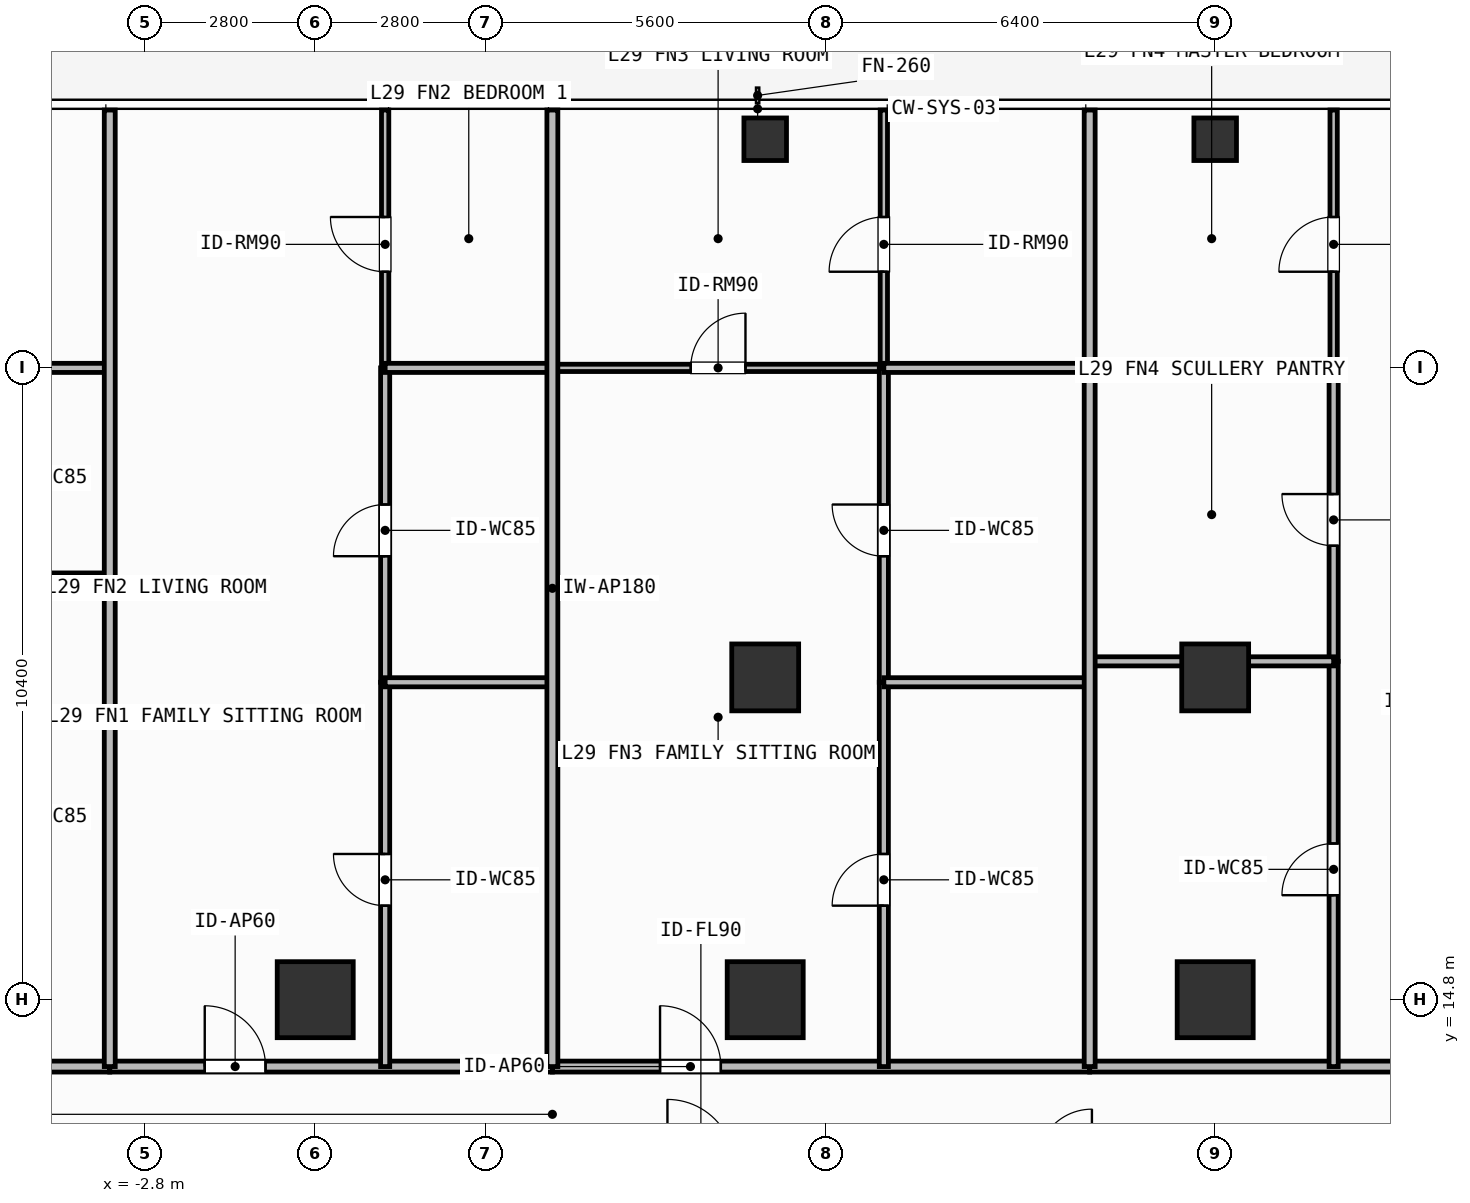
"""IFC4 building model, lengths in metres.
Left out: names, types, materials, properties, quantities, classifications, styles, units other than length and angle.
Written with IfcOpenShell. Run it as: python <this file> out.ifc"""

import sys

from ifc_helpers import new_model, si_unit, direction, frame, frame_2d, origin, origin_2d, place, context, subcontext, project, spatial, rectangle, hollow_rectangle, extrude, element, fill, save


model = new_model("IFC4")
c1 = context("Model", 3, precision=1e-05, world=origin(), true_north=direction((0.0, 1.0)))
c2 = subcontext(c1, "Body", "Model", "MODEL_VIEW")
j1 = project(units=[si_unit("LENGTHUNIT", "METRE"), si_unit("PLANEANGLEUNIT", "RADIAN")], contexts=[c1])
p1 = place(None, origin())
s1 = spatial("IfcSite", under=j1, at=p1, CompositionType="ELEMENT")
p2 = place(p1, origin())
s2 = spatial("IfcBuilding", under=s1, at=p2, CompositionType="ELEMENT")
p3 = place(p2, frame((0.0, 0.0, 117.3)))
s3 = spatial("IfcBuildingStorey", under=s2, at=p3, CompositionType="ELEMENT", Elevation=117.3)
for number, where, z_axis, x_axis in (
    (1, (0.0, 14.8, 0.0), (0.0, 0.0, 1.0), (1.0, 0.0, 0.0)),
    (2, (7.4, 14.8, 0.0), (0.0, 0.0, 1.0), (1.0, 0.0, 0.0)),
    (3, (14.8, 14.8, 0.0), (0.0, 0.0, 1.0), (1.0, 0.0, 0.0)),
):
    element("IfcColumn", number, at=place(p3, frame(where, z_axis=z_axis, x_axis=x_axis)), inside=s3, PredefinedType="COLUMN", context=c2, shape_type="SweptSolid", body=[
        extrude(rectangle(XDim=1.25, YDim=1.25, at=origin_2d()), origin(), (0.0, 0.0, 1.0), 3.9),
    ])
for number, where, z_axis, x_axis in (
    (4, (7.4, 20.1, 0.0), (0.0, 0.0, 1.0), (1.0, 0.0, 0.0)),
    (5, (14.8, 20.1, 0.0), (0.0, 0.0, 1.0), (1.0, 0.0, 0.0)),
):
    element("IfcColumn", number, at=place(p3, frame(where, z_axis=z_axis, x_axis=x_axis)), inside=s3, PredefinedType="COLUMN", context=c2, shape_type="SweptSolid", body=[
        extrude(rectangle(XDim=1.1, YDim=1.1, at=origin_2d()), origin(), (0.0, 0.0, 1.0), 3.9),
    ])
for number, where, z_axis, x_axis in (
    (6, (7.4, 28.95, 0.0), (0.0, 0.0, 1.0), (1.0, 0.0, 0.0)),
    (7, (14.8, 28.95, 0.0), (0.0, 0.0, 1.0), (1.0, 0.0, 0.0)),
):
    element("IfcColumn", number, at=place(p3, frame(where, z_axis=z_axis, x_axis=x_axis)), inside=s3, PredefinedType="COLUMN", context=c2, shape_type="SweptSolid", body=[
        extrude(hollow_rectangle(XDim=0.7, YDim=0.7, WallThickness=0.032, at=origin_2d()), origin(), (0.0, 0.0, 1.0), 3.9),
    ])
p4 = place(p3, frame((-16.32, 13.7, 0.0), z_axis=(0.0, 0.0, 1.0), x_axis=(1.0, 0.0, 0.0)))
e8 = element("IfcWall", 8, at=p4, inside=s3, PredefinedType="PARTITIONING", context=c2, shape_type="SweptSolid", body=[
    extrude(rectangle(XDim=12.941, YDim=0.18, at=frame_2d((6.471, 0.0))), origin(), (0.0, 0.0, 1.0), 3.68),
])
p5 = place(p4, frame((6.417, 0.0, 0.0)))
e9 = element("IfcOpeningElement", 9, at=p5, cuts=e8, PredefinedType="OPENING", context=c2, shape_type="SweptSolid", body=[
    extrude(rectangle(XDim=1.0, YDim=2.2, at=frame_2d((0.5, 1.1))), frame((0.0, 0.1, 0.0), z_axis=(0.0, -1.0, 0.0), x_axis=(1.0, 0.0, 0.0)), (0.0, 0.0, 1.0), 0.2),
])
p6 = place(p3, frame((-3.379, 13.7, 0.0), z_axis=(0.0, 0.0, 1.0), x_axis=(1.0, 0.0, 0.0)))
e10 = element("IfcWall", 10, at=p6, inside=s3, PredefinedType="PARTITIONING", context=c2, shape_type="SweptSolid", body=[
    extrude(rectangle(XDim=7.279, YDim=0.18, at=frame_2d((3.639, 0.0))), origin(), (0.0, 0.0, 1.0), 3.68),
])
p7 = place(p6, frame((1.562, 0.0, 0.0)))
e11 = element("IfcOpeningElement", 11, at=p7, cuts=e10, PredefinedType="OPENING", context=c2, shape_type="SweptSolid", body=[
    extrude(rectangle(XDim=1.0, YDim=2.2, at=frame_2d((0.5, 1.1))), frame((0.0, 0.1, 0.0), z_axis=(0.0, -1.0, 0.0), x_axis=(1.0, 0.0, 0.0)), (0.0, 0.0, 1.0), 0.2),
])
p8 = place(p3, frame((1.15, 13.7, 0.0), z_axis=(0.0, 0.0, 1.0), x_axis=(0.0, 1.0, 0.0)))
e12 = element("IfcWall", 12, at=p8, inside=s3, PredefinedType="PARTITIONING", context=c2, shape_type="SweptSolid", body=[
    extrude(rectangle(XDim=6.32, YDim=0.15, at=frame_2d((3.16, 0.0))), origin(), (0.0, 0.0, 1.0), 3.68),
])
p9 = place(p8, frame((2.646, 0.0, 0.0)))
e13 = element("IfcOpeningElement", 13, at=p9, cuts=e12, PredefinedType="OPENING", context=c2, shape_type="SweptSolid", body=[
    extrude(rectangle(XDim=0.85, YDim=2.1, at=frame_2d((0.425, 1.05))), frame((0.0, 0.085, 0.0), z_axis=(0.0, -1.0, 0.0), x_axis=(1.0, 0.0, 0.0)), (0.0, 0.0, 1.0), 0.17),
])
p10 = place(p3, frame((1.15, 20.02, 0.0), z_axis=(0.0, 0.0, 1.0), x_axis=(0.0, 1.0, 0.0)))
e14 = element("IfcWall", 14, at=p10, inside=s3, PredefinedType="PARTITIONING", context=c2, shape_type="SweptSolid", body=[
    extrude(rectangle(XDim=5.17, YDim=0.15, at=frame_2d((2.585, 0.0))), origin(), (0.0, 0.0, 1.0), 3.68),
])
p11 = place(p10, frame((2.073, 0.0, 0.0)))
e15 = element("IfcOpeningElement", 15, at=p11, cuts=e14, PredefinedType="OPENING", context=c2, shape_type="SweptSolid", body=[
    extrude(rectangle(XDim=0.85, YDim=2.1, at=frame_2d((0.425, 1.05))), frame((0.0, 0.085, 0.0), z_axis=(0.0, -1.0, 0.0), x_axis=(1.0, 0.0, 0.0)), (0.0, 0.0, 1.0), 0.17),
])
p12 = place(p3, frame((1.15, 25.19, 0.0), z_axis=(0.0, 0.0, 1.0), x_axis=(0.0, 1.0, 0.0)))
e16 = element("IfcWall", 16, at=p12, inside=s3, PredefinedType="PARTITIONING", context=c2, shape_type="SweptSolid", body=[
    extrude(rectangle(XDim=4.24, YDim=0.12, at=frame_2d((2.12, 0.0))), origin(), (0.0, 0.0, 1.0), 3.68),
])
p13 = place(p12, frame((1.581, 0.0, 0.0)))
e17 = element("IfcOpeningElement", 17, at=p13, cuts=e16, PredefinedType="OPENING", context=c2, shape_type="SweptSolid", body=[
    extrude(rectangle(XDim=0.9, YDim=2.1, at=frame_2d((0.45, 1.05))), frame((0.0, 0.07, 0.0), z_axis=(0.0, -1.0, 0.0), x_axis=(1.0, 0.0, 0.0)), (0.0, 0.0, 1.0), 0.14),
])
p14 = place(p3, frame((3.9, 13.7, 0.0), z_axis=(0.0, 0.0, 1.0), x_axis=(1.0, 0.0, 0.0)))
e18 = element("IfcWall", 18, at=p14, inside=s3, PredefinedType="PARTITIONING", context=c2, shape_type="SweptSolid", body=[
    extrude(rectangle(XDim=8.836, YDim=0.18, at=frame_2d((4.418, 0.0))), origin(), (0.0, 0.0, 1.0), 3.68),
])
p15 = place(p14, frame((1.771, 0.0, 0.0)))
e19 = element("IfcOpeningElement", 19, at=p15, cuts=e18, PredefinedType="OPENING", context=c2, shape_type="SweptSolid", body=[
    extrude(rectangle(XDim=1.0, YDim=2.2, at=frame_2d((0.5, 1.1))), frame((0.0, 0.1, 0.0), z_axis=(0.0, -1.0, 0.0), x_axis=(1.0, 0.0, 0.0)), (0.0, 0.0, 1.0), 0.2),
])
p16 = place(p3, frame((3.9, 25.19, 0.0), z_axis=(0.0, 0.0, 1.0), x_axis=(1.0, 0.0, 0.0)))
e20 = element("IfcWall", 20, at=p16, inside=s3, PredefinedType="PARTITIONING", context=c2, shape_type="SweptSolid", body=[
    extrude(rectangle(XDim=5.451, YDim=0.12, at=frame_2d((2.726, 0.0))), origin(), (0.0, 0.0, 1.0), 3.68),
])
p17 = place(p16, frame((2.275, 0.0, 0.0)))
e21 = element("IfcOpeningElement", 21, at=p17, cuts=e20, PredefinedType="OPENING", context=c2, shape_type="SweptSolid", body=[
    extrude(rectangle(XDim=0.9, YDim=2.1, at=frame_2d((0.45, 1.05))), frame((0.0, 0.07, 0.0), z_axis=(0.0, -1.0, 0.0), x_axis=(1.0, 0.0, 0.0)), (0.0, 0.0, 1.0), 0.14),
])
p18 = place(p3, frame((9.351, 13.7, 0.0), z_axis=(0.0, 0.0, 1.0), x_axis=(0.0, 1.0, 0.0)))
e22 = element("IfcWall", 22, at=p18, inside=s3, PredefinedType="PARTITIONING", context=c2, shape_type="SweptSolid", body=[
    extrude(rectangle(XDim=6.32, YDim=0.15, at=frame_2d((3.16, 0.0))), origin(), (0.0, 0.0, 1.0), 3.68),
])
p19 = place(p18, frame((2.646, 0.0, 0.0)))
e23 = element("IfcOpeningElement", 23, at=p19, cuts=e22, PredefinedType="OPENING", context=c2, shape_type="SweptSolid", body=[
    extrude(rectangle(XDim=0.85, YDim=2.1, at=frame_2d((0.425, 1.05))), frame((0.0, 0.085, 0.0), z_axis=(0.0, -1.0, 0.0), x_axis=(1.0, 0.0, 0.0)), (0.0, 0.0, 1.0), 0.17),
])
p20 = place(p3, frame((9.351, 20.02, 0.0), z_axis=(0.0, 0.0, 1.0), x_axis=(0.0, 1.0, 0.0)))
e24 = element("IfcWall", 24, at=p20, inside=s3, PredefinedType="PARTITIONING", context=c2, shape_type="SweptSolid", body=[
    extrude(rectangle(XDim=5.17, YDim=0.15, at=frame_2d((2.585, 0.0))), origin(), (0.0, 0.0, 1.0), 3.68),
])
p21 = place(p20, frame((2.073, 0.0, 0.0)))
e25 = element("IfcOpeningElement", 25, at=p21, cuts=e24, PredefinedType="OPENING", context=c2, shape_type="SweptSolid", body=[
    extrude(rectangle(XDim=0.85, YDim=2.1, at=frame_2d((0.425, 1.05))), frame((0.0, 0.085, 0.0), z_axis=(0.0, -1.0, 0.0), x_axis=(1.0, 0.0, 0.0)), (0.0, 0.0, 1.0), 0.17),
])
p22 = place(p3, frame((9.351, 25.19, 0.0), z_axis=(0.0, 0.0, 1.0), x_axis=(0.0, 1.0, 0.0)))
e26 = element("IfcWall", 26, at=p22, inside=s3, PredefinedType="PARTITIONING", context=c2, shape_type="SweptSolid", body=[
    extrude(rectangle(XDim=4.24, YDim=0.12, at=frame_2d((2.12, 0.0))), origin(), (0.0, 0.0, 1.0), 3.68),
])
p23 = place(p22, frame((1.581, 0.0, 0.0)))
e27 = element("IfcOpeningElement", 27, at=p23, cuts=e26, PredefinedType="OPENING", context=c2, shape_type="SweptSolid", body=[
    extrude(rectangle(XDim=0.9, YDim=2.1, at=frame_2d((0.45, 1.05))), frame((0.0, 0.07, 0.0), z_axis=(0.0, -1.0, 0.0), x_axis=(1.0, 0.0, 0.0)), (0.0, 0.0, 1.0), 0.14),
])
p24 = place(p3, frame((12.736, 13.7, 0.0), z_axis=(0.0, 0.0, 1.0), x_axis=(1.0, 0.0, 0.0)))
e28 = element("IfcWall", 28, at=p24, inside=s3, PredefinedType="PARTITIONING", context=c2, shape_type="SweptSolid", body=[
    extrude(rectangle(XDim=11.384, YDim=0.18, at=frame_2d((5.692, 0.0))), origin(), (0.0, 0.0, 1.0), 3.68),
])
p25 = place(p24, frame((5.012, 0.0, 0.0)))
e29 = element("IfcOpeningElement", 29, at=p25, cuts=e28, PredefinedType="OPENING", context=c2, shape_type="SweptSolid", body=[
    extrude(rectangle(XDim=1.0, YDim=2.2, at=frame_2d((0.5, 1.1))), frame((0.0, 0.1, 0.0), z_axis=(0.0, -1.0, 0.0), x_axis=(1.0, 0.0, 0.0)), (0.0, 0.0, 1.0), 0.2),
])
p26 = place(p3, frame((16.748, 13.7, 0.0), z_axis=(0.0, 0.0, 1.0), x_axis=(0.0, 1.0, 0.0)))
e30 = element("IfcWall", 30, at=p26, inside=s3, PredefinedType="PARTITIONING", context=c2, shape_type="SweptSolid", body=[
    extrude(rectangle(XDim=6.664, YDim=0.15, at=frame_2d((3.332, 0.0))), origin(), (0.0, 0.0, 1.0), 3.68),
])
p27 = place(p26, frame((2.818, 0.0, 0.0)))
e31 = element("IfcOpeningElement", 31, at=p27, cuts=e30, PredefinedType="OPENING", context=c2, shape_type="SweptSolid", body=[
    extrude(rectangle(XDim=0.85, YDim=2.1, at=frame_2d((0.425, 1.05))), frame((0.0, 0.085, 0.0), z_axis=(0.0, -1.0, 0.0), x_axis=(1.0, 0.0, 0.0)), (0.0, 0.0, 1.0), 0.17),
])
p28 = place(p3, frame((16.748, 20.364, 0.0), z_axis=(0.0, 0.0, 1.0), x_axis=(0.0, 1.0, 0.0)))
e32 = element("IfcWall", 32, at=p28, inside=s3, PredefinedType="PARTITIONING", context=c2, shape_type="SweptSolid", body=[
    extrude(rectangle(XDim=4.826, YDim=0.15, at=frame_2d((2.413, 0.0))), origin(), (0.0, 0.0, 1.0), 3.68),
])
p29 = place(p28, frame((1.901, 0.0, 0.0)))
e33 = element("IfcOpeningElement", 33, at=p29, cuts=e32, PredefinedType="OPENING", context=c2, shape_type="SweptSolid", body=[
    extrude(rectangle(XDim=0.85, YDim=2.1, at=frame_2d((0.425, 1.05))), frame((0.0, 0.085, 0.0), z_axis=(0.0, -1.0, 0.0), x_axis=(1.0, 0.0, 0.0)), (0.0, 0.0, 1.0), 0.17),
])
p30 = place(p3, frame((16.748, 25.19, 0.0), z_axis=(0.0, 0.0, 1.0), x_axis=(0.0, 1.0, 0.0)))
e34 = element("IfcWall", 34, at=p30, inside=s3, PredefinedType="PARTITIONING", context=c2, shape_type="SweptSolid", body=[
    extrude(rectangle(XDim=4.24, YDim=0.12, at=frame_2d((2.12, 0.0))), origin(), (0.0, 0.0, 1.0), 3.68),
])
p31 = place(p30, frame((1.581, 0.0, 0.0)))
e35 = element("IfcOpeningElement", 35, at=p31, cuts=e34, PredefinedType="OPENING", context=c2, shape_type="SweptSolid", body=[
    extrude(rectangle(XDim=0.9, YDim=2.1, at=frame_2d((0.45, 1.05))), frame((0.0, 0.07, 0.0), z_axis=(0.0, -1.0, 0.0), x_axis=(1.0, 0.0, 0.0)), (0.0, 0.0, 1.0), 0.14),
])
for number, where, z_axis, x_axis in (
    (36, (-6.229, 21.743, 0.0), (0.0, 0.0, 1.0), (1.0, 0.0, 0.0)),
    (37, (-6.229, 25.19, 0.0), (0.0, 0.0, 1.0), (1.0, 0.0, 0.0)),
):
    element("IfcWall", number, at=place(p3, frame(where, z_axis=z_axis, x_axis=x_axis)), inside=s3, PredefinedType="PARTITIONING", context=c2, shape_type="SweptSolid", body=[
        extrude(rectangle(XDim=2.85, YDim=0.15, at=frame_2d((1.425, 0.0))), origin(), (0.0, 0.0, 1.0), 3.68),
    ])
p32 = place(p3, frame((1.15, 20.02, 0.0), z_axis=(0.0, 0.0, 1.0), x_axis=(1.0, 0.0, 0.0)))
e38 = element("IfcWall", 38, at=p32, inside=s3, PredefinedType="PARTITIONING", context=c2, shape_type="SweptSolid", body=[
    extrude(rectangle(XDim=2.75, YDim=0.15, at=frame_2d((1.375, 0.0))), origin(), (0.0, 0.0, 1.0), 3.082),
])
p33 = place(p3, frame((1.15, 25.19, 0.0), z_axis=(0.0, 0.0, 1.0), x_axis=(1.0, 0.0, 0.0)))
e39 = element("IfcWall", 39, at=p33, inside=s3, PredefinedType="PARTITIONING", context=c2, shape_type="SweptSolid", body=[
    extrude(rectangle(XDim=2.75, YDim=0.15, at=frame_2d((1.375, 0.0))), origin(), (0.0, 0.0, 1.0), 3.68),
])
p34 = place(p3, frame((-3.379, 13.7, 0.0), z_axis=(0.0, 0.0, 1.0), x_axis=(0.0, 1.0, 0.0)))
e40 = element("IfcWall", 40, at=p34, inside=s3, PredefinedType="PARTITIONING", context=c2, shape_type="SweptSolid", body=[
    extrude(rectangle(XDim=15.73, YDim=0.18, at=frame_2d((7.865, 0.0))), origin(), (0.0, 0.0, 1.0), 3.68),
])
p35 = place(p3, frame((9.351, 20.02, 0.0), z_axis=(0.0, 0.0, 1.0), x_axis=(1.0, 0.0, 0.0)))
e41 = element("IfcWall", 41, at=p35, inside=s3, PredefinedType="PARTITIONING", context=c2, shape_type="SweptSolid", body=[
    extrude(rectangle(XDim=3.385, YDim=0.15, at=frame_2d((1.692, 0.0))), origin(), (0.0, 0.0, 1.0), 3.082),
])
p36 = place(p3, frame((9.351, 25.19, 0.0), z_axis=(0.0, 0.0, 1.0), x_axis=(1.0, 0.0, 0.0)))
e42 = element("IfcWall", 42, at=p36, inside=s3, PredefinedType="PARTITIONING", context=c2, shape_type="SweptSolid", body=[
    extrude(rectangle(XDim=3.385, YDim=0.15, at=frame_2d((1.692, 0.0))), origin(), (0.0, 0.0, 1.0), 3.68),
])
p37 = place(p3, frame((3.9, 13.7, 0.0), z_axis=(0.0, 0.0, 1.0), x_axis=(0.0, 1.0, 0.0)))
e43 = element("IfcWall", 43, at=p37, inside=s3, PredefinedType="PARTITIONING", context=c2, shape_type="SweptSolid", body=[
    extrude(rectangle(XDim=15.73, YDim=0.18, at=frame_2d((7.865, 0.0))), origin(), (0.0, 0.0, 1.0), 3.68),
])
p38 = place(p3, frame((12.736, 20.364, 0.0), z_axis=(0.0, 0.0, 1.0), x_axis=(1.0, 0.0, 0.0)))
e44 = element("IfcWall", 44, at=p38, inside=s3, PredefinedType="PARTITIONING", context=c2, shape_type="SweptSolid", body=[
    extrude(rectangle(XDim=4.012, YDim=0.15, at=frame_2d((2.006, 0.0))), origin(), (0.0, 0.0, 1.0), 3.082),
])
p39 = place(p3, frame((12.736, 25.19, 0.0), z_axis=(0.0, 0.0, 1.0), x_axis=(1.0, 0.0, 0.0)))
e45 = element("IfcWall", 45, at=p39, inside=s3, PredefinedType="PARTITIONING", context=c2, shape_type="SweptSolid", body=[
    extrude(rectangle(XDim=4.012, YDim=0.15, at=frame_2d((2.006, 0.0))), origin(), (0.0, 0.0, 1.0), 3.68),
])
p40 = place(p3, frame((12.736, 13.7, 0.0), z_axis=(0.0, 0.0, 1.0), x_axis=(0.0, 1.0, 0.0)))
e46 = element("IfcWall", 46, at=p40, inside=s3, PredefinedType="PARTITIONING", context=c2, shape_type="SweptSolid", body=[
    extrude(rectangle(XDim=15.73, YDim=0.18, at=frame_2d((7.865, 0.0))), origin(), (0.0, 0.0, 1.0), 3.68),
])
p41 = place(p7, origin())
e47 = element("IfcDoor", 47, at=p41, inside=s3, OperationType="SINGLE_SWING_LEFT", PredefinedType="DOOR", context=c2, shape_type="SweptSolid", body=[
    extrude(rectangle(XDim=1.0, YDim=2.2, at=frame_2d((0.5, 1.1))), frame((0.0, 0.025, 0.0), z_axis=(0.0, -1.0, 0.0), x_axis=(1.0, 0.0, 0.0)), (0.0, 0.0, 1.0), 0.05),
])
fill(e11, e47)
p42 = place(p9, origin())
e48 = element("IfcDoor", 48, at=p42, inside=s3, OperationType="SINGLE_SWING_RIGHT", PredefinedType="DOOR", context=c2, shape_type="SweptSolid", body=[
    extrude(rectangle(XDim=0.85, YDim=2.1, at=frame_2d((0.425, 1.05))), frame((0.0, 0.025, 0.0), z_axis=(0.0, -1.0, 0.0), x_axis=(1.0, 0.0, 0.0)), (0.0, 0.0, 1.0), 0.05),
])
fill(e13, e48)
p43 = place(p11, origin())
e49 = element("IfcDoor", 49, at=p43, inside=s3, OperationType="SINGLE_SWING_LEFT", PredefinedType="DOOR", context=c2, shape_type="SweptSolid", body=[
    extrude(rectangle(XDim=0.85, YDim=2.1, at=frame_2d((0.425, 1.05))), frame((0.0, 0.025, 0.0), z_axis=(0.0, -1.0, 0.0), x_axis=(1.0, 0.0, 0.0)), (0.0, 0.0, 1.0), 0.05),
])
fill(e15, e49)
p44 = place(p13, origin())
e50 = element("IfcDoor", 50, at=p44, inside=s3, OperationType="SINGLE_SWING_RIGHT", PredefinedType="DOOR", context=c2, shape_type="SweptSolid", body=[
    extrude(rectangle(XDim=0.9, YDim=2.1, at=frame_2d((0.45, 1.05))), frame((0.0, 0.025, 0.0), z_axis=(0.0, -1.0, 0.0), x_axis=(1.0, 0.0, 0.0)), (0.0, 0.0, 1.0), 0.05),
])
fill(e17, e50)
p45 = place(p15, origin())
e51 = element("IfcDoor", 51, at=p45, inside=s3, OperationType="SINGLE_SWING_LEFT", PredefinedType="DOOR", context=c2, shape_type="SweptSolid", body=[
    extrude(rectangle(XDim=1.0, YDim=2.2, at=frame_2d((0.5, 1.1))), frame((0.0, 0.025, 0.0), z_axis=(0.0, -1.0, 0.0), x_axis=(1.0, 0.0, 0.0)), (0.0, 0.0, 1.0), 0.05),
])
fill(e19, e51)
p46 = place(p17, origin())
e52 = element("IfcDoor", 52, at=p46, inside=s3, OperationType="SINGLE_SWING_RIGHT", PredefinedType="DOOR", context=c2, shape_type="SweptSolid", body=[
    extrude(rectangle(XDim=0.9, YDim=2.1, at=frame_2d((0.45, 1.05))), frame((0.0, 0.025, 0.0), z_axis=(0.0, -1.0, 0.0), x_axis=(1.0, 0.0, 0.0)), (0.0, 0.0, 1.0), 0.05),
])
fill(e21, e52)
p47 = place(p19, origin())
e53 = element("IfcDoor", 53, at=p47, inside=s3, OperationType="SINGLE_SWING_LEFT", PredefinedType="DOOR", context=c2, shape_type="SweptSolid", body=[
    extrude(rectangle(XDim=0.85, YDim=2.1, at=frame_2d((0.425, 1.05))), frame((0.0, 0.025, 0.0), z_axis=(0.0, -1.0, 0.0), x_axis=(1.0, 0.0, 0.0)), (0.0, 0.0, 1.0), 0.05),
])
fill(e23, e53)
p48 = place(p21, origin())
e54 = element("IfcDoor", 54, at=p48, inside=s3, OperationType="SINGLE_SWING_RIGHT", PredefinedType="DOOR", context=c2, shape_type="SweptSolid", body=[
    extrude(rectangle(XDim=0.85, YDim=2.1, at=frame_2d((0.425, 1.05))), frame((0.0, 0.025, 0.0), z_axis=(0.0, -1.0, 0.0), x_axis=(1.0, 0.0, 0.0)), (0.0, 0.0, 1.0), 0.05),
])
fill(e25, e54)
p49 = place(p23, origin())
e55 = element("IfcDoor", 55, at=p49, inside=s3, OperationType="SINGLE_SWING_LEFT", PredefinedType="DOOR", context=c2, shape_type="SweptSolid", body=[
    extrude(rectangle(XDim=0.9, YDim=2.1, at=frame_2d((0.45, 1.05))), frame((0.0, 0.025, 0.0), z_axis=(0.0, -1.0, 0.0), x_axis=(1.0, 0.0, 0.0)), (0.0, 0.0, 1.0), 0.05),
])
fill(e27, e55)
p50 = place(p27, origin())
e56 = element("IfcDoor", 56, at=p50, inside=s3, OperationType="SINGLE_SWING_LEFT", PredefinedType="DOOR", context=c2, shape_type="SweptSolid", body=[
    extrude(rectangle(XDim=0.85, YDim=2.1, at=frame_2d((0.425, 1.05))), frame((0.0, 0.025, 0.0), z_axis=(0.0, -1.0, 0.0), x_axis=(1.0, 0.0, 0.0)), (0.0, 0.0, 1.0), 0.05),
])
fill(e31, e56)
p51 = place(p29, origin())
e57 = element("IfcDoor", 57, at=p51, inside=s3, OperationType="SINGLE_SWING_RIGHT", PredefinedType="DOOR", context=c2, shape_type="SweptSolid", body=[
    extrude(rectangle(XDim=0.85, YDim=2.1, at=frame_2d((0.425, 1.05))), frame((0.0, 0.025, 0.0), z_axis=(0.0, -1.0, 0.0), x_axis=(1.0, 0.0, 0.0)), (0.0, 0.0, 1.0), 0.05),
])
fill(e33, e57)
p52 = place(p31, origin())
e58 = element("IfcDoor", 58, at=p52, inside=s3, OperationType="SINGLE_SWING_LEFT", PredefinedType="DOOR", context=c2, shape_type="SweptSolid", body=[
    extrude(rectangle(XDim=0.9, YDim=2.1, at=frame_2d((0.45, 1.05))), frame((0.0, 0.025, 0.0), z_axis=(0.0, -1.0, 0.0), x_axis=(1.0, 0.0, 0.0)), (0.0, 0.0, 1.0), 0.05),
])
fill(e35, e58)
save(model, sys.argv[1])
